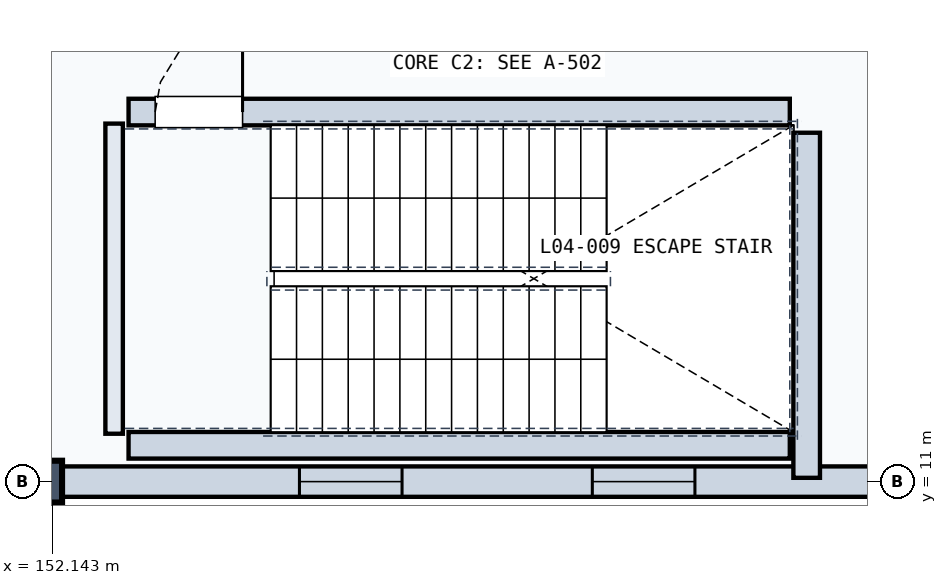
"""IFC4 building model, lengths in metres.
Left out: names, types, materials, properties, quantities, classifications, styles, units other than length and angle.
Written with IfcOpenShell. Run it as: python <this file> out.ifc"""

import sys

from ifc_helpers import new_model, si_unit, direction, frame, frame_2d, origin, origin_2d, place, context, subcontext, project, spatial, rectangle, extrude, element, fill, save


model = new_model("IFC4")
c1 = context("Model", 3, precision=1e-05, world=origin(), true_north=direction((0.0, 1.0)))
c2 = subcontext(c1, "Body", "Model", "MODEL_VIEW")
j1 = project(units=[si_unit("LENGTHUNIT", "METRE"), si_unit("PLANEANGLEUNIT", "RADIAN")], contexts=[c1])
p1 = place(None, origin())
s1 = spatial("IfcSite", under=j1, at=p1, CompositionType="ELEMENT")
p2 = place(p1, origin())
s2 = spatial("IfcBuilding", under=s1, at=p2, CompositionType="ELEMENT")
p3 = place(p2, frame((0.0, 0.0, 19.5)))
s3 = spatial("IfcBuildingStorey", under=s2, at=p3, CompositionType="ELEMENT", Elevation=19.5)
p4 = place(p3, frame((152.0, 11.0, 0.0), z_axis=(0.0, 0.0, 1.0), x_axis=(1.0, 0.0, 0.0)))
e1 = element("IfcColumn", 1, at=p4, inside=s3, PredefinedType="COLUMN", context=c2, shape_type="SweptSolid", body=[
    extrude(rectangle(XDim=0.55, YDim=0.55, at=origin_2d()), origin(), (0.0, 0.0, 1.0), 4.8),
])
p5 = place(p3, frame((152.22, 11.0, 0.0), z_axis=(0.0, 0.0, 1.0), x_axis=(1.0, 0.0, 0.0)))
e2 = element("IfcWall", 2, at=p5, inside=s3, PredefinedType="SOLIDWALL", context=c2, shape_type="SweptSolid", body=[
    extrude(rectangle(XDim=11.56, YDim=0.4, at=frame_2d((5.78, 0.0))), origin(), (0.0, 0.0, 1.0), 3.79),
])
p6 = place(p5, frame((3.178, 0.0, 0.8)))
e3 = element("IfcOpeningElement", 3, at=p6, cuts=e2, PredefinedType="OPENING", context=c2, shape_type="SweptSolid", body=[
    extrude(rectangle(XDim=1.35, YDim=2.1, at=frame_2d((0.675, 1.05))), frame((0.0, 0.21, 0.0), z_axis=(0.0, -1.0, 0.0), x_axis=(1.0, 0.0, 0.0)), (0.0, 0.0, 1.0), 0.42),
])
p7 = place(p5, frame((7.032, 0.0, 0.8)))
e4 = element("IfcOpeningElement", 4, at=p7, cuts=e2, PredefinedType="OPENING", context=c2, shape_type="SweptSolid", body=[
    extrude(rectangle(XDim=1.35, YDim=2.1, at=frame_2d((0.675, 1.05))), frame((0.0, 0.21, 0.0), z_axis=(0.0, -1.0, 0.0), x_axis=(1.0, 0.0, 0.0)), (0.0, 0.0, 1.0), 0.42),
])
p8 = place(p3, frame((152.96, 11.63, 0.0), z_axis=(0.0, 0.0, 1.0), x_axis=(0.0, 1.0, 0.0)))
e5 = element("IfcWall", 5, at=p8, inside=s3, PredefinedType="SOLIDWALL", context=c2, shape_type="SweptSolid", body=[
    extrude(rectangle(XDim=4.08, YDim=0.23, at=frame_2d((2.04, 0.0))), origin(), (0.0, 0.0, 1.0), 4.46),
])
p9 = place(p3, frame((162.072, 11.05, 0.0), z_axis=(0.0, 0.0, 1.0), x_axis=(0.0, 1.0, 0.0)))
e6 = element("IfcWall", 6, at=p9, inside=s3, PredefinedType="SOLIDWALL", context=c2, shape_type="SweptSolid", body=[
    extrude(rectangle(XDim=4.54, YDim=0.35, at=frame_2d((2.27, 0.0))), origin(), (0.0, 0.0, 1.0), 4.46),
])
p10 = place(p3, frame((153.15, 11.478, 0.0), z_axis=(0.0, 0.0, 1.0), x_axis=(1.0, 0.0, 0.0)))
e7 = element("IfcWall", 7, at=p10, inside=s3, PredefinedType="SOLIDWALL", context=c2, shape_type="SweptSolid", body=[
    extrude(rectangle(XDim=8.7, YDim=0.35, at=frame_2d((4.35, 0.0))), origin(), (0.0, 0.0, 1.0), 4.46),
])
p11 = place(p3, frame((153.15, 15.862, 0.0), z_axis=(0.0, 0.0, 1.0), x_axis=(1.0, 0.0, 0.0)))
e8 = element("IfcWall", 8, at=p11, inside=s3, PredefinedType="SOLIDWALL", context=c2, shape_type="SweptSolid", body=[
    extrude(rectangle(XDim=8.7, YDim=0.35, at=frame_2d((4.35, 0.0))), origin(), (0.0, 0.0, 1.0), 4.46),
])
p12 = place(p11, frame((0.35, 0.0, 0.0)))
e9 = element("IfcOpeningElement", 9, at=p12, cuts=e8, PredefinedType="OPENING", context=c2, shape_type="SweptSolid", body=[
    extrude(rectangle(XDim=1.15, YDim=2.2, at=frame_2d((0.575, 1.1))), frame((0.0, 0.185, 0.0), z_axis=(0.0, -1.0, 0.0), x_axis=(1.0, 0.0, 0.0)), (0.0, 0.0, 1.0), 0.37),
])
p13 = place(p6, origin())
e10 = element("IfcWindow", 10, at=p13, inside=s3, PartitioningType="SINGLE_PANEL", PredefinedType="WINDOW", context=c2, shape_type="SweptSolid", body=[
    extrude(rectangle(XDim=1.35, YDim=2.1, at=frame_2d((0.675, 1.05))), frame((0.0, 0.03, 0.0), z_axis=(0.0, -1.0, 0.0), x_axis=(1.0, 0.0, 0.0)), (0.0, 0.0, 1.0), 0.06),
])
fill(e3, e10)
p14 = place(p7, origin())
e11 = element("IfcWindow", 11, at=p14, inside=s3, PartitioningType="SINGLE_PANEL", PredefinedType="WINDOW", context=c2, shape_type="SweptSolid", body=[
    extrude(rectangle(XDim=1.35, YDim=2.1, at=frame_2d((0.675, 1.05))), frame((0.0, 0.03, 0.0), z_axis=(0.0, -1.0, 0.0), x_axis=(1.0, 0.0, 0.0)), (0.0, 0.0, 1.0), 0.06),
])
fill(e4, e11)
p15 = place(p12, origin())
e12 = element("IfcDoor", 12, at=p15, inside=s3, OperationType="SINGLE_SWING_RIGHT", PredefinedType="DOOR", context=c2, shape_type="SweptSolid", body=[
    extrude(rectangle(XDim=1.15, YDim=2.2, at=frame_2d((0.575, 1.1))), frame((0.0, 0.025, 0.0), z_axis=(0.0, -1.0, 0.0), x_axis=(1.0, 0.0, 0.0)), (0.0, 0.0, 1.0), 0.05),
])
fill(e9, e12)
save(model, sys.argv[1])
